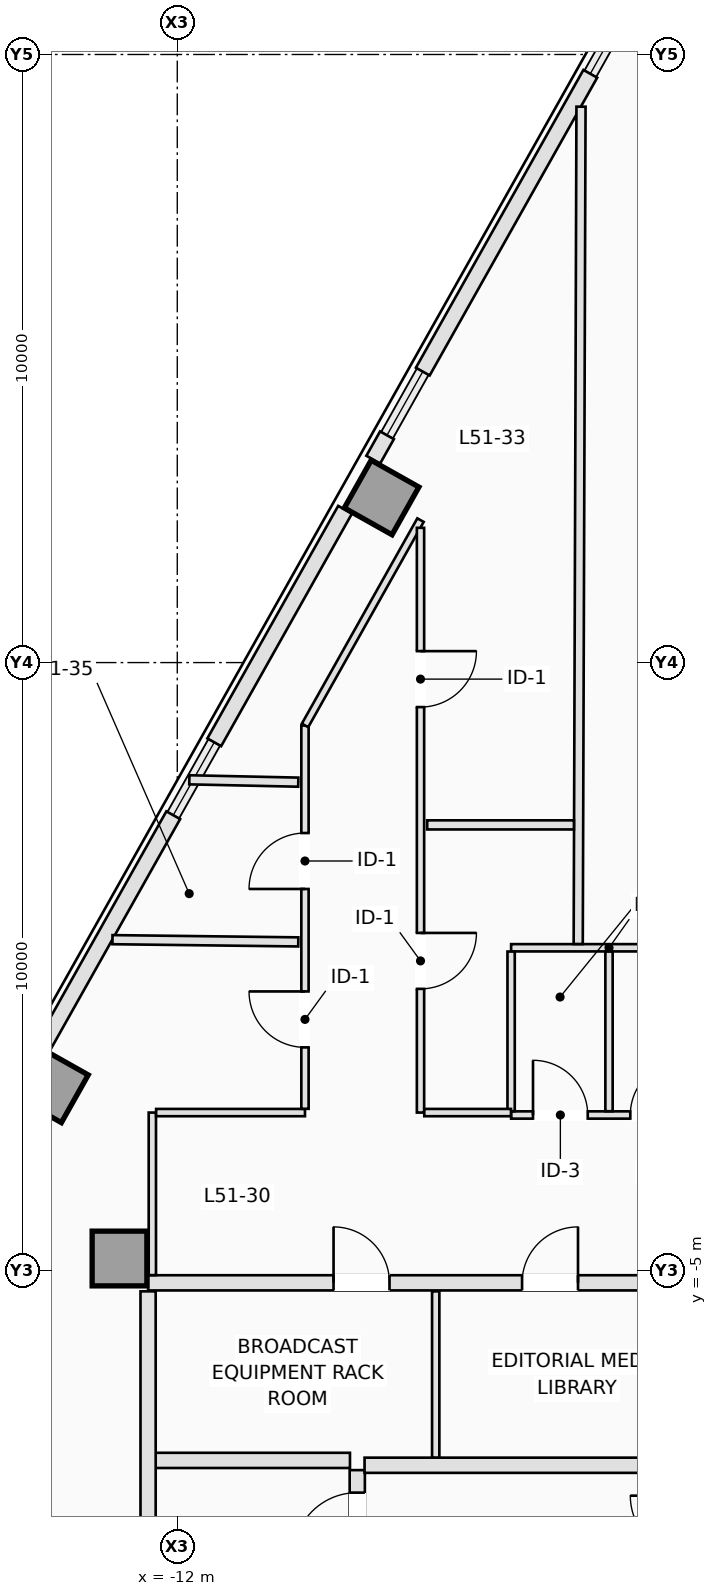
"""IFC4 building model, lengths in metres.
Left out: names, types, materials, properties, quantities, classifications, styles, units other than length and angle.
Written with IfcOpenShell. Run it as: python <this file> out.ifc"""

import sys

from ifc_helpers import new_model, si_unit, direction, frame, frame_2d, origin, origin_2d, place, context, subcontext, project, spatial, rectangle, extrude, element, fill, save


model = new_model("IFC4")
c1 = context("Model", 3, precision=1e-05, world=origin(), true_north=direction((0.0, 1.0)))
c2 = subcontext(c1, "Body", "Model", "MODEL_VIEW")
j1 = project(units=[si_unit("LENGTHUNIT", "METRE"), si_unit("PLANEANGLEUNIT", "RADIAN")], contexts=[c1])
p1 = place(None, origin())
s1 = spatial("IfcSite", under=j1, at=p1, CompositionType="ELEMENT")
p2 = place(p1, origin())
s2 = spatial("IfcBuilding", under=s1, at=p2, CompositionType="ELEMENT")
p3 = place(p2, frame((0.0, 0.0, 186.9)))
s3 = spatial("IfcBuildingStorey", under=s2, at=p3, CompositionType="ELEMENT", Elevation=186.9)
for number, where, z_axis, x_axis in (
    (1, (-12.95, -4.8, 0.0), (0.0, 0.0, 1.0), (1.0, 0.0, 0.0)),
    (2, (-8.64, 7.715, 0.0), (0.0, 0.0, 1.0), (-0.872, 0.49, 0.0)),
    (3, (-14.077, -1.952, 0.0), (0.0, 0.0, 1.0), (-0.872, 0.49, 0.0)),
):
    element("IfcColumn", number, at=place(p3, frame(where, z_axis=z_axis, x_axis=x_axis)), inside=s3, PredefinedType="COLUMN", context=c2, shape_type="SweptSolid", body=[
        extrude(rectangle(XDim=0.9, YDim=0.9, at=origin_2d()), origin(), (0.0, 0.0, 1.0), 3.5),
    ])
p4 = place(p3, frame((-8.777, 8.337, 0.0), z_axis=(0.0, 0.0, 1.0), x_axis=(0.490412424957, 0.871490478116, 0.0)))
e4 = element("IfcWall", 4, at=p4, inside=s3, PredefinedType="STANDARD", context=c2, shape_type="SweptSolid", body=[
    extrude(rectangle(XDim=0.46, YDim=0.26, at=frame_2d((0.23, 0.0))), origin(), (0.0, 0.0, 1.0), 3.25),
])
p5 = place(p3, frame((-7.962, 9.785, 0.0), z_axis=(0.0, 0.0, 1.0), x_axis=(0.490240608828, 0.871587141631, 0.0)))
e5 = element("IfcWall", 5, at=p5, inside=s3, PredefinedType="STANDARD", context=c2, shape_type="SweptSolid", body=[
    extrude(rectangle(XDim=5.618, YDim=0.26, at=frame_2d((2.809, 0.0))), origin(), (0.0, 0.0, 1.0), 3.25),
])
p6 = place(p3, frame((-14.217, -1.334, 0.0), z_axis=(0.0, 0.0, 1.0), x_axis=(0.490261239633, 0.871575537125, 0.0)))
e6 = element("IfcWall", 6, at=p6, inside=s3, PredefinedType="STANDARD", context=c2, shape_type="SweptSolid", body=[
    extrude(rectangle(XDim=4.388, YDim=0.26, at=frame_2d((2.194, 0.0))), origin(), (0.0, 0.0, 1.0), 3.25),
])
p7 = place(p3, frame((-11.392, 3.689, 0.0), z_axis=(0.0, 0.0, 1.0), x_axis=(0.490237464814, 0.871588910033, 0.0)))
e7 = element("IfcWall", 7, at=p7, inside=s3, PredefinedType="STANDARD", context=c2, shape_type="SweptSolid", body=[
    extrude(rectangle(XDim=4.388, YDim=0.26, at=frame_2d((2.194, 0.0))), origin(), (0.0, 0.0, 1.0), 3.25),
])
p8 = place(p3, frame((-9.04, -10.18, 0.0), z_axis=(0.0, 0.0, 1.0), x_axis=(0.0, 1.0, 0.0)))
e8 = element("IfcWall", 8, at=p8, inside=s3, PredefinedType="PARTITIONING", context=c2, shape_type="SweptSolid", body=[
    extrude(rectangle(XDim=1.9, YDim=0.25, at=frame_2d((0.95, 0.0))), origin(), (0.0, 0.0, 1.0), 3.25),
])
p9 = place(p8, frame((0.48, 0.0, 0.0)))
e9 = element("IfcOpeningElement", 9, at=p9, cuts=e8, PredefinedType="OPENING", context=c2, shape_type="SweptSolid", body=[
    extrude(rectangle(XDim=1.05, YDim=2.15, at=frame_2d((0.525, 1.075))), frame((0.0, 0.135, 0.0), z_axis=(0.0, -1.0, 0.0), x_axis=(1.0, 0.0, 0.0)), (0.0, 0.0, 1.0), 0.27),
])
p10 = place(p3, frame((-12.38, -8.12, 0.0), z_axis=(0.0, 0.0, 1.0), x_axis=(1.0, 0.0, 0.0)))
e10 = element("IfcWall", 10, at=p10, inside=s3, PredefinedType="PARTITIONING", context=c2, shape_type="SweptSolid", body=[
    extrude(rectangle(XDim=3.22, YDim=0.25, at=frame_2d((1.61, 0.0))), origin(), (0.0, 0.0, 1.0), 3.25),
])
p11 = place(p3, frame((-12.48, -10.18, 0.0), z_axis=(0.0, 0.0, 1.0), x_axis=(0.0, 1.0, 0.0)))
e11 = element("IfcWall", 11, at=p11, inside=s3, PredefinedType="PARTITIONING", context=c2, shape_type="SweptSolid", body=[
    extrude(rectangle(XDim=4.84, YDim=0.25, at=frame_2d((2.42, 0.0))), origin(), (0.0, 0.0, 1.0), 3.25),
])
p12 = place(p3, frame((-8.92, -8.2, 0.0), z_axis=(0.0, 0.0, 1.0), x_axis=(1.0, 0.0, 0.0)))
e12 = element("IfcWall", 12, at=p12, inside=s3, PredefinedType="PARTITIONING", context=c2, shape_type="SweptSolid", body=[
    extrude(rectangle(XDim=5.24, YDim=0.25, at=frame_2d((2.62, 0.0))), origin(), (0.0, 0.0, 1.0), 3.25),
])
p13 = place(p3, frame((-12.48, -5.2, 0.0), z_axis=(0.0, 0.0, 1.0), x_axis=(1.0, 0.0, 0.0)))
e13 = element("IfcWall", 13, at=p13, inside=s3, PredefinedType="PARTITIONING", context=c2, shape_type="SweptSolid", body=[
    extrude(rectangle(XDim=8.278, YDim=0.25, at=frame_2d((4.139, 0.0))), origin(), (0.0, 0.0, 1.0), 3.25),
])
p14 = place(p13, frame((3.05, 0.0, 0.0)))
e14 = element("IfcOpeningElement", 14, at=p14, cuts=e13, PredefinedType="OPENING", context=c2, shape_type="SweptSolid", body=[
    extrude(rectangle(XDim=0.92, YDim=2.12, at=frame_2d((0.46, 1.06))), frame((0.0, 0.135, 0.0), z_axis=(0.0, -1.0, 0.0), x_axis=(1.0, 0.0, 0.0)), (0.0, 0.0, 1.0), 0.27),
])
p15 = place(p13, frame((6.15, 0.0, 0.0)))
e15 = element("IfcOpeningElement", 15, at=p15, cuts=e13, PredefinedType="OPENING", context=c2, shape_type="SweptSolid", body=[
    extrude(rectangle(XDim=0.92, YDim=2.12, at=frame_2d((0.46, 1.06))), frame((0.0, 0.135, 0.0), z_axis=(0.0, -1.0, 0.0), x_axis=(1.0, 0.0, 0.0)), (0.0, 0.0, 1.0), 0.27),
])
p16 = place(p3, frame((-7.75, -8.073, 0.0), z_axis=(0.0, 0.0, 1.0), x_axis=(0.0, 1.0, 0.0)))
e16 = element("IfcWall", 16, at=p16, inside=s3, PredefinedType="PARTITIONING", context=c2, shape_type="SweptSolid", body=[
    extrude(rectangle(XDim=2.733, YDim=0.12, at=frame_2d((1.366, 0.0))), origin(), (0.0, 0.0, 1.0), 3.25),
])
p17 = place(p3, frame((-6.51, -2.44, 0.0), z_axis=(0.0, 0.0, 1.0), x_axis=(1.0, 0.0, 0.0)))
e17 = element("IfcWall", 17, at=p17, inside=s3, PredefinedType="PARTITIONING", context=c2, shape_type="SweptSolid", body=[
    extrude(rectangle(XDim=3.22, YDim=0.12, at=frame_2d((1.61, 0.0))), origin(), (0.0, 0.0, 1.0), 2.943),
])
p18 = place(p17, frame((0.36, 0.0, 0.0)))
e18 = element("IfcOpeningElement", 18, at=p18, cuts=e17, PredefinedType="OPENING", context=c2, shape_type="SweptSolid", body=[
    extrude(rectangle(XDim=0.9, YDim=2.12, at=frame_2d((0.45, 1.06))), frame((0.0, 0.07, 0.0), z_axis=(0.0, -1.0, 0.0), x_axis=(1.0, 0.0, 0.0)), (0.0, 0.0, 1.0), 0.14),
])
p19 = place(p17, frame((1.96, 0.0, 0.0)))
e19 = element("IfcOpeningElement", 19, at=p19, cuts=e17, PredefinedType="OPENING", context=c2, shape_type="SweptSolid", body=[
    extrude(rectangle(XDim=0.9, YDim=2.12, at=frame_2d((0.45, 1.06))), frame((0.0, 0.07, 0.0), z_axis=(0.0, -1.0, 0.0), x_axis=(1.0, 0.0, 0.0)), (0.0, 0.0, 1.0), 0.14),
])
p20 = place(p3, frame((-6.51, 0.31, 0.0), z_axis=(0.0, 0.0, 1.0), x_axis=(1.0, 0.0, 0.0)))
e20 = element("IfcWall", 20, at=p20, inside=s3, PredefinedType="PARTITIONING", context=c2, shape_type="SweptSolid", body=[
    extrude(rectangle(XDim=3.22, YDim=0.12, at=frame_2d((1.61, 0.0))), origin(), (0.0, 0.0, 1.0), 3.25),
])
for number, where, z_axis, x_axis in (
    (21, (-6.51, -2.378, 0.0), (0.0, 0.0, 1.0), (0.0, 1.0, 0.0)),
    (22, (-4.9, -2.378, 0.0), (0.0, 0.0, 1.0), (0.0, 1.0, 0.0)),
):
    element("IfcWall", number, at=place(p3, frame(where, z_axis=z_axis, x_axis=x_axis)), inside=s3, PredefinedType="PARTITIONING", context=c2, shape_type="SweptSolid", body=[
        extrude(rectangle(XDim=2.626, YDim=0.12, at=frame_2d((1.313, 0.0))), origin(), (0.0, 0.0, 1.0), 3.25),
    ])
p21 = place(p3, frame((-12.41, -5.073, 0.0), z_axis=(0.0, 0.0, 1.0), x_axis=(0.0, 1.0, 0.0)))
e23 = element("IfcWall", 23, at=p21, inside=s3, PredefinedType="PARTITIONING", context=c2, shape_type="SweptSolid", body=[
    extrude(rectangle(XDim=2.673, YDim=0.12, at=frame_2d((1.336, 0.0))), origin(), (0.0, 0.0, 1.0), 3.25),
])
p22 = place(p3, frame((-12.348, -2.4, 0.0), z_axis=(0.0, 0.0, 1.0), x_axis=(1.0, 0.0, 0.0)))
e24 = element("IfcWall", 24, at=p22, inside=s3, PredefinedType="PARTITIONING", context=c2, shape_type="SweptSolid", body=[
    extrude(rectangle(XDim=2.448, YDim=0.12, at=frame_2d((1.224, 0.0))), origin(), (0.0, 0.0, 1.0), 3.25),
])
p23 = place(p3, frame((-9.9, -2.338, 0.0), z_axis=(0.0, 0.0, 1.0), x_axis=(0.0, 1.0, 0.0)))
e25 = element("IfcWall", 25, at=p23, inside=s3, PredefinedType="PARTITIONING", context=c2, shape_type="SweptSolid", body=[
    extrude(rectangle(XDim=6.303, YDim=0.12, at=frame_2d((3.151, 0.0))), origin(), (0.0, 0.0, 1.0), 3.25),
])
p24 = place(p23, frame((3.615, 0.0, 0.0)))
e26 = element("IfcOpeningElement", 26, at=p24, cuts=e25, PredefinedType="OPENING", context=c2, shape_type="SweptSolid", body=[
    extrude(rectangle(XDim=0.92, YDim=2.12, at=frame_2d((0.46, 1.06))), frame((0.0, 0.07, 0.0), z_axis=(0.0, -1.0, 0.0), x_axis=(1.0, 0.0, 0.0)), (0.0, 0.0, 1.0), 0.14),
])
p25 = place(p23, frame((1.01, 0.0, 0.0)))
e27 = element("IfcOpeningElement", 27, at=p25, cuts=e25, PredefinedType="OPENING", context=c2, shape_type="SweptSolid", body=[
    extrude(rectangle(XDim=0.92, YDim=2.12, at=frame_2d((0.46, 1.06))), frame((0.0, 0.07, 0.0), z_axis=(0.0, -1.0, 0.0), x_axis=(1.0, 0.0, 0.0)), (0.0, 0.0, 1.0), 0.14),
])
p26 = place(p3, frame((-9.899, 3.967, 0.0), z_axis=(0.0, 0.0, 1.0), x_axis=(0.490276203052, 0.871567120032, 0.0)))
e28 = element("IfcWall", 28, at=p26, inside=s3, PredefinedType="PARTITIONING", context=c2, shape_type="SweptSolid", body=[
    extrude(rectangle(XDim=3.873, YDim=0.12, at=frame_2d((1.937, 0.0))), origin(), (0.0, 0.0, 1.0), 3.25),
])
p27 = place(p3, frame((-8.0, 7.216, 0.0), z_axis=(0.0, 0.0, 1.0), x_axis=(0.0, -1.0, 0.0)))
e29 = element("IfcWall", 29, at=p27, inside=s3, PredefinedType="PARTITIONING", context=c2, shape_type="SweptSolid", body=[
    extrude(rectangle(XDim=9.616, YDim=0.12, at=frame_2d((4.808, 0.0))), origin(), (0.0, 0.0, 1.0), 3.25),
])
p28 = place(p27, frame((2.028, 0.0, 0.0)))
e30 = element("IfcOpeningElement", 30, at=p28, cuts=e29, PredefinedType="OPENING", context=c2, shape_type="SweptSolid", body=[
    extrude(rectangle(XDim=0.92, YDim=2.12, at=frame_2d((0.46, 1.06))), frame((0.0, 0.07, 0.0), z_axis=(0.0, -1.0, 0.0), x_axis=(1.0, 0.0, 0.0)), (0.0, 0.0, 1.0), 0.14),
])
p29 = place(p27, frame((6.662, 0.0, 0.0)))
e31 = element("IfcOpeningElement", 31, at=p29, cuts=e29, PredefinedType="OPENING", context=c2, shape_type="SweptSolid", body=[
    extrude(rectangle(XDim=0.92, YDim=2.12, at=frame_2d((0.46, 1.06))), frame((0.0, 0.07, 0.0), z_axis=(0.0, -1.0, 0.0), x_axis=(1.0, 0.0, 0.0)), (0.0, 0.0, 1.0), 0.14),
])
p30 = place(p3, frame((-7.938, -2.4, 0.0), z_axis=(0.0, 0.0, 1.0), x_axis=(1.0, 0.0, 0.0)))
e32 = element("IfcWall", 32, at=p30, inside=s3, PredefinedType="PARTITIONING", context=c2, shape_type="SweptSolid", body=[
    extrude(rectangle(XDim=1.426, YDim=0.12, at=frame_2d((0.713, 0.0))), origin(), (0.0, 0.0, 1.0), 3.25),
])
p31 = place(p3, frame((-5.406, 0.372, 0.0), z_axis=(0.0, 0.0, 1.0), x_axis=(0.003333314815, 0.999994444491, 0.0)))
e33 = element("IfcWall", 33, at=p31, inside=s3, PredefinedType="PARTITIONING", context=c2, shape_type="SweptSolid", body=[
    extrude(rectangle(XDim=13.77, YDim=0.15, at=frame_2d((6.885, 0.0))), origin(), (0.0, 0.0, 1.0), 3.25),
])
p32 = place(p3, frame((-10.01, 3.033, 0.0), z_axis=(0.0, 0.0, 1.0), x_axis=(-0.999765394805, 0.021659994246, 0.0)))
e34 = element("IfcWall", 34, at=p32, inside=s3, PredefinedType="PARTITIONING", context=c2, shape_type="SweptSolid", body=[
    extrude(rectangle(XDim=1.792, YDim=0.15, at=frame_2d((0.896, 0.0))), origin(), (0.0, 0.0, 1.0), 3.25),
])
p33 = place(p3, frame((-5.477, 2.331, 0.0), z_axis=(0.0, 0.0, 1.0), x_axis=(-1.0, 0.0, 0.0)))
e35 = element("IfcWall", 35, at=p33, inside=s3, PredefinedType="PARTITIONING", context=c2, shape_type="SweptSolid", body=[
    extrude(rectangle(XDim=2.413, YDim=0.15, at=frame_2d((1.207, 0.0))), origin(), (0.0, 0.0, 1.0), 3.25),
])
p34 = place(p3, frame((-10.01, 0.406, 0.0), z_axis=(0.0, 0.0, 1.0), x_axis=(-0.999927242797, 0.0120627158, 0.0)))
e36 = element("IfcWall", 36, at=p34, inside=s3, PredefinedType="PARTITIONING", context=c2, shape_type="SweptSolid", body=[
    extrude(rectangle(XDim=3.056, YDim=0.15, at=frame_2d((1.528, 0.0))), origin(), (0.0, 0.0, 1.0), 3.25),
])
p35 = place(p9, origin())
e37 = element("IfcDoor", 37, at=p35, inside=s3, OperationType="SINGLE_SWING_LEFT", PredefinedType="DOOR", context=c2, shape_type="SweptSolid", body=[
    extrude(rectangle(XDim=1.05, YDim=2.15, at=frame_2d((0.525, 1.075))), frame((0.0, 0.025, 0.0), z_axis=(0.0, -1.0, 0.0), x_axis=(1.0, 0.0, 0.0)), (0.0, 0.0, 1.0), 0.05),
])
fill(e9, e37)
p36 = place(p14, origin())
e38 = element("IfcDoor", 38, at=p36, inside=s3, OperationType="SINGLE_SWING_LEFT", PredefinedType="DOOR", context=c2, shape_type="SweptSolid", body=[
    extrude(rectangle(XDim=0.92, YDim=2.12, at=frame_2d((0.46, 1.06))), frame((0.0, 0.025, 0.0), z_axis=(0.0, -1.0, 0.0), x_axis=(1.0, 0.0, 0.0)), (0.0, 0.0, 1.0), 0.05),
])
fill(e14, e38)
p37 = place(p15, origin())
e39 = element("IfcDoor", 39, at=p37, inside=s3, OperationType="SINGLE_SWING_RIGHT", PredefinedType="DOOR", context=c2, shape_type="SweptSolid", body=[
    extrude(rectangle(XDim=0.92, YDim=2.12, at=frame_2d((0.46, 1.06))), frame((0.0, 0.025, 0.0), z_axis=(0.0, -1.0, 0.0), x_axis=(1.0, 0.0, 0.0)), (0.0, 0.0, 1.0), 0.05),
])
fill(e15, e39)
p38 = place(p18, origin())
e40 = element("IfcDoor", 40, at=p38, inside=s3, OperationType="SINGLE_SWING_LEFT", PredefinedType="DOOR", context=c2, shape_type="SweptSolid", body=[
    extrude(rectangle(XDim=0.9, YDim=2.12, at=frame_2d((0.45, 1.06))), frame((0.0, 0.025, 0.0), z_axis=(0.0, -1.0, 0.0), x_axis=(1.0, 0.0, 0.0)), (0.0, 0.0, 1.0), 0.05),
])
fill(e18, e40)
p39 = place(p19, origin())
e41 = element("IfcDoor", 41, at=p39, inside=s3, OperationType="SINGLE_SWING_RIGHT", PredefinedType="DOOR", context=c2, shape_type="SweptSolid", body=[
    extrude(rectangle(XDim=0.9, YDim=2.12, at=frame_2d((0.45, 1.06))), frame((0.0, 0.025, 0.0), z_axis=(0.0, -1.0, 0.0), x_axis=(1.0, 0.0, 0.0)), (0.0, 0.0, 1.0), 0.05),
])
fill(e19, e41)
p40 = place(p28, origin())
e42 = element("IfcDoor", 42, at=p40, inside=s3, OperationType="SINGLE_SWING_LEFT", PredefinedType="DOOR", context=c2, shape_type="SweptSolid", body=[
    extrude(rectangle(XDim=0.92, YDim=2.12, at=frame_2d((0.46, 1.06))), frame((0.0, 0.025, 0.0), z_axis=(0.0, -1.0, 0.0), x_axis=(1.0, 0.0, 0.0)), (0.0, 0.0, 1.0), 0.05),
])
fill(e30, e42)
p41 = place(p24, origin())
e43 = element("IfcDoor", 43, at=p41, inside=s3, OperationType="SINGLE_SWING_LEFT", PredefinedType="DOOR", context=c2, shape_type="SweptSolid", body=[
    extrude(rectangle(XDim=0.92, YDim=2.12, at=frame_2d((0.46, 1.06))), frame((0.0, 0.025, 0.0), z_axis=(0.0, -1.0, 0.0), x_axis=(1.0, 0.0, 0.0)), (0.0, 0.0, 1.0), 0.05),
])
fill(e26, e43)
p42 = place(p29, origin())
e44 = element("IfcDoor", 44, at=p42, inside=s3, OperationType="SINGLE_SWING_LEFT", PredefinedType="DOOR", context=c2, shape_type="SweptSolid", body=[
    extrude(rectangle(XDim=0.92, YDim=2.12, at=frame_2d((0.46, 1.06))), frame((0.0, 0.025, 0.0), z_axis=(0.0, -1.0, 0.0), x_axis=(1.0, 0.0, 0.0)), (0.0, 0.0, 1.0), 0.05),
])
fill(e31, e44)
p43 = place(p25, origin())
e45 = element("IfcDoor", 45, at=p43, inside=s3, OperationType="SINGLE_SWING_RIGHT", PredefinedType="DOOR", context=c2, shape_type="SweptSolid", body=[
    extrude(rectangle(XDim=0.92, YDim=2.12, at=frame_2d((0.46, 1.06))), frame((0.0, 0.025, 0.0), z_axis=(0.0, -1.0, 0.0), x_axis=(1.0, 0.0, 0.0)), (0.0, 0.0, 1.0), 0.05),
])
fill(e27, e45)
save(model, sys.argv[1])
